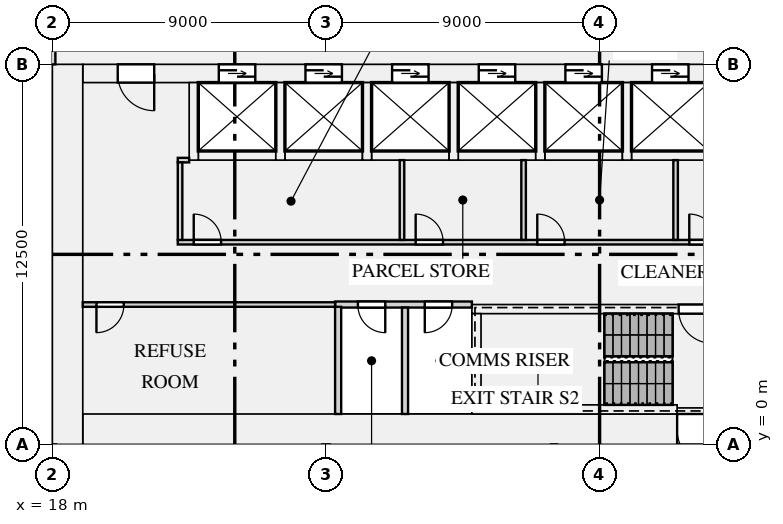
"""IFC4 building model, lengths in metres.
Left out: names, types, materials, properties, quantities, classifications, styles, units other than length and angle.
Written with IfcOpenShell. Run it as: python <this file> out.ifc"""

import sys

from ifc_helpers import new_model, si_unit, direction, frame, frame_2d, origin, place, context, subcontext, project, spatial, rectangle, extrude, element, fill, save


model = new_model("IFC4")
c1 = context("Model", 3, precision=1e-05, world=origin(), true_north=direction((0.0, 1.0)))
c2 = subcontext(c1, "Body", "Model", "MODEL_VIEW")
j1 = project(units=[si_unit("LENGTHUNIT", "METRE"), si_unit("PLANEANGLEUNIT", "RADIAN")], contexts=[c1])
p1 = place(None, origin())
s1 = spatial("IfcSite", under=j1, at=p1, CompositionType="ELEMENT")
p2 = place(p1, origin())
s2 = spatial("IfcBuilding", under=s1, at=p2, CompositionType="ELEMENT")
p3 = place(p2, origin())
s3 = spatial("IfcBuildingStorey", under=s2, at=p3, CompositionType="ELEMENT", Elevation=0.0)
p4 = place(p3, frame((18.5, 0.0, 0.0), z_axis=(0.0, 0.0, 1.0), x_axis=(0.0, 1.0, 0.0)))
e1 = element("IfcWall", 1, at=p4, inside=s3, PredefinedType="SHEAR", context=c2, shape_type="SweptSolid", body=[
    extrude(rectangle(XDim=12.5, YDim=1.0, at=frame_2d((6.25, 0.0))), origin(), (0.0, 0.0, 1.0), 6.5),
])
p5 = place(p3, frame((19.0, 0.5, 0.0), z_axis=(0.0, 0.0, 1.0), x_axis=(1.0, 0.0, 0.0)))
e2 = element("IfcWall", 2, at=p5, inside=s3, PredefinedType="SHEAR", context=c2, shape_type="SweptSolid", body=[
    extrude(rectangle(XDim=34.0, YDim=1.0, at=frame_2d((17.0, 0.0))), origin(), (0.0, 0.0, 1.0), 6.5),
])
p6 = place(p5, frame((19.55, 0.0, 0.0)))
e3 = element("IfcOpeningElement", 3, at=p6, cuts=e2, PredefinedType="OPENING", context=c2, shape_type="SweptSolid", body=[
    extrude(rectangle(XDim=1.2, YDim=2.1, at=frame_2d((0.6, 1.05))), frame((0.0, 0.51, 0.0), z_axis=(0.0, -1.0, 0.0), x_axis=(1.0, 0.0, 0.0)), (0.0, 0.0, 1.0), 1.02),
])
p7 = place(p3, frame((19.0, 12.2, 0.0), z_axis=(0.0, 0.0, 1.0), x_axis=(1.0, 0.0, 0.0)))
e4 = element("IfcWall", 4, at=p7, inside=s3, PredefinedType="SHEAR", context=c2, shape_type="SweptSolid", body=[
    extrude(rectangle(XDim=34.0, YDim=0.6, at=frame_2d((17.0, 0.0))), origin(), (0.0, 0.0, 1.0), 6.5),
])
p8 = place(p7, frame((4.475, 0.0, 0.0)))
e5 = element("IfcOpeningElement", 5, at=p8, cuts=e4, PredefinedType="OPENING", context=c2, shape_type="SweptSolid", body=[
    extrude(rectangle(XDim=1.2, YDim=2.1, at=frame_2d((0.6, 1.05))), frame((0.0, 0.31, 0.0), z_axis=(0.0, -1.0, 0.0), x_axis=(1.0, 0.0, 0.0)), (0.0, 0.0, 1.0), 0.62),
])
p9 = place(p7, frame((7.325, 0.0, 0.0)))
e6 = element("IfcOpeningElement", 6, at=p9, cuts=e4, PredefinedType="OPENING", context=c2, shape_type="SweptSolid", body=[
    extrude(rectangle(XDim=1.2, YDim=2.1, at=frame_2d((0.6, 1.05))), frame((0.0, 0.31, 0.0), z_axis=(0.0, -1.0, 0.0), x_axis=(1.0, 0.0, 0.0)), (0.0, 0.0, 1.0), 0.62),
])
p10 = place(p7, frame((10.175, 0.0, 0.0)))
e7 = element("IfcOpeningElement", 7, at=p10, cuts=e4, PredefinedType="OPENING", context=c2, shape_type="SweptSolid", body=[
    extrude(rectangle(XDim=1.2, YDim=2.1, at=frame_2d((0.6, 1.05))), frame((0.0, 0.31, 0.0), z_axis=(0.0, -1.0, 0.0), x_axis=(1.0, 0.0, 0.0)), (0.0, 0.0, 1.0), 0.62),
])
p11 = place(p7, frame((13.025, 0.0, 0.0)))
e8 = element("IfcOpeningElement", 8, at=p11, cuts=e4, PredefinedType="OPENING", context=c2, shape_type="SweptSolid", body=[
    extrude(rectangle(XDim=1.2, YDim=2.1, at=frame_2d((0.6, 1.05))), frame((0.0, 0.31, 0.0), z_axis=(0.0, -1.0, 0.0), x_axis=(1.0, 0.0, 0.0)), (0.0, 0.0, 1.0), 0.62),
])
p12 = place(p7, frame((15.875, 0.0, 0.0)))
e9 = element("IfcOpeningElement", 9, at=p12, cuts=e4, PredefinedType="OPENING", context=c2, shape_type="SweptSolid", body=[
    extrude(rectangle(XDim=1.2, YDim=2.1, at=frame_2d((0.6, 1.05))), frame((0.0, 0.31, 0.0), z_axis=(0.0, -1.0, 0.0), x_axis=(1.0, 0.0, 0.0)), (0.0, 0.0, 1.0), 0.62),
])
p13 = place(p7, frame((18.725, 0.0, 0.0)))
e10 = element("IfcOpeningElement", 10, at=p13, cuts=e4, PredefinedType="OPENING", context=c2, shape_type="SweptSolid", body=[
    extrude(rectangle(XDim=1.2, YDim=2.1, at=frame_2d((0.6, 1.05))), frame((0.0, 0.31, 0.0), z_axis=(0.0, -1.0, 0.0), x_axis=(1.0, 0.0, 0.0)), (0.0, 0.0, 1.0), 0.62),
])
p14 = place(p7, frame((21.575, 0.0, 0.0)))
e11 = element("IfcOpeningElement", 11, at=p14, cuts=e4, PredefinedType="OPENING", context=c2, shape_type="SweptSolid", body=[
    extrude(rectangle(XDim=1.2, YDim=2.1, at=frame_2d((0.6, 1.05))), frame((0.0, 0.31, 0.0), z_axis=(0.0, -1.0, 0.0), x_axis=(1.0, 0.0, 0.0)), (0.0, 0.0, 1.0), 0.62),
])
p15 = place(p7, frame((24.175, 0.0, 0.0)))
e12 = element("IfcOpeningElement", 12, at=p15, cuts=e4, PredefinedType="OPENING", context=c2, shape_type="SweptSolid", body=[
    extrude(rectangle(XDim=1.1, YDim=2.1, at=frame_2d((0.55, 1.05))), frame((0.0, 0.31, 0.0), z_axis=(0.0, -1.0, 0.0), x_axis=(1.0, 0.0, 0.0)), (0.0, 0.0, 1.0), 0.62),
])
p16 = place(p7, frame((26.425, 0.0, 0.0)))
e13 = element("IfcOpeningElement", 13, at=p16, cuts=e4, PredefinedType="OPENING", context=c2, shape_type="SweptSolid", body=[
    extrude(rectangle(XDim=1.1, YDim=2.1, at=frame_2d((0.55, 1.05))), frame((0.0, 0.31, 0.0), z_axis=(0.0, -1.0, 0.0), x_axis=(1.0, 0.0, 0.0)), (0.0, 0.0, 1.0), 0.62),
])
p17 = place(p7, frame((28.675, 0.0, 0.0)))
e14 = element("IfcOpeningElement", 14, at=p17, cuts=e4, PredefinedType="OPENING", context=c2, shape_type="SweptSolid", body=[
    extrude(rectangle(XDim=1.1, YDim=2.1, at=frame_2d((0.55, 1.05))), frame((0.0, 0.31, 0.0), z_axis=(0.0, -1.0, 0.0), x_axis=(1.0, 0.0, 0.0)), (0.0, 0.0, 1.0), 0.62),
])
p18 = place(p7, frame((1.15, 0.0, 0.0)))
e15 = element("IfcOpeningElement", 15, at=p18, cuts=e4, PredefinedType="OPENING", context=c2, shape_type="SweptSolid", body=[
    extrude(rectangle(XDim=1.2, YDim=2.1, at=frame_2d((0.6, 1.05))), frame((0.0, 0.31, 0.0), z_axis=(0.0, -1.0, 0.0), x_axis=(1.0, 0.0, 0.0)), (0.0, 0.0, 1.0), 0.62),
])
p19 = place(p7, frame((31.65, 0.0, 0.0)))
e16 = element("IfcOpeningElement", 16, at=p19, cuts=e4, PredefinedType="OPENING", context=c2, shape_type="SweptSolid", body=[
    extrude(rectangle(XDim=1.2, YDim=2.1, at=frame_2d((0.6, 1.05))), frame((0.0, 0.31, 0.0), z_axis=(0.0, -1.0, 0.0), x_axis=(1.0, 0.0, 0.0)), (0.0, 0.0, 1.0), 0.62),
])
p20 = place(p3, frame((22.8, 9.5, 0.0), z_axis=(0.0, 0.0, 1.0), x_axis=(1.0, 0.0, 0.0)))
e17 = element("IfcWall", 17, at=p20, inside=s3, PredefinedType="SHEAR", context=c2, shape_type="SweptSolid", body=[
    extrude(rectangle(XDim=2.55, YDim=0.3, at=frame_2d((1.275, 0.0))), origin(), (0.0, 0.0, 1.0), 6.5),
])
p21 = place(p3, frame((22.65, 9.35, 0.0), z_axis=(0.0, 0.0, 1.0), x_axis=(0.0, 1.0, 0.0)))
e18 = element("IfcWall", 18, at=p21, inside=s3, PredefinedType="SHEAR", context=c2, shape_type="SweptSolid", body=[
    extrude(rectangle(XDim=2.55, YDim=0.3, at=frame_2d((1.275, 0.0))), origin(), (0.0, 0.0, 1.0), 6.5),
])
p22 = place(p3, frame((25.65, 9.5, 0.0), z_axis=(0.0, 0.0, 1.0), x_axis=(1.0, 0.0, 0.0)))
e19 = element("IfcWall", 19, at=p22, inside=s3, PredefinedType="SHEAR", context=c2, shape_type="SweptSolid", body=[
    extrude(rectangle(XDim=2.55, YDim=0.3, at=frame_2d((1.275, 0.0))), origin(), (0.0, 0.0, 1.0), 6.5),
])
p23 = place(p3, frame((25.5, 9.35, 0.0), z_axis=(0.0, 0.0, 1.0), x_axis=(0.0, 1.0, 0.0)))
e20 = element("IfcWall", 20, at=p23, inside=s3, PredefinedType="SHEAR", context=c2, shape_type="SweptSolid", body=[
    extrude(rectangle(XDim=2.55, YDim=0.3, at=frame_2d((1.275, 0.0))), origin(), (0.0, 0.0, 1.0), 6.5),
])
p24 = place(p3, frame((28.5, 9.5, 0.0), z_axis=(0.0, 0.0, 1.0), x_axis=(1.0, 0.0, 0.0)))
e21 = element("IfcWall", 21, at=p24, inside=s3, PredefinedType="SHEAR", context=c2, shape_type="SweptSolid", body=[
    extrude(rectangle(XDim=2.55, YDim=0.3, at=frame_2d((1.275, 0.0))), origin(), (0.0, 0.0, 1.0), 6.5),
])
for number, where, z_axis, x_axis in (
    (22, (28.35, 9.35, 0.0), (0.0, 0.0, 1.0), (0.0, 1.0, 0.0)),
    (23, (31.35, 9.5, 0.0), (0.0, 0.0, 1.0), (1.0, 0.0, 0.0)),
    (24, (31.2, 9.35, 0.0), (0.0, 0.0, 1.0), (0.0, 1.0, 0.0)),
):
    element("IfcWall", number, at=place(p3, frame(where, z_axis=z_axis, x_axis=x_axis)), inside=s3, PredefinedType="SHEAR", context=c2, shape_type="SweptSolid", body=[
        extrude(rectangle(XDim=2.55, YDim=0.3, at=frame_2d((1.275, 0.0))), origin(), (0.0, 0.0, 1.0), 6.5),
    ])
p25 = place(p3, frame((34.2, 9.5, 0.0), z_axis=(0.0, 0.0, 1.0), x_axis=(1.0, 0.0, 0.0)))
e25 = element("IfcWall", 25, at=p25, inside=s3, PredefinedType="SHEAR", context=c2, shape_type="SweptSolid", body=[
    extrude(rectangle(XDim=2.55, YDim=0.3, at=frame_2d((1.275, 0.0))), origin(), (0.0, 0.0, 1.0), 6.5),
])
p26 = place(p3, frame((34.05, 9.35, 0.0), z_axis=(0.0, 0.0, 1.0), x_axis=(0.0, 1.0, 0.0)))
e26 = element("IfcWall", 26, at=p26, inside=s3, PredefinedType="SHEAR", context=c2, shape_type="SweptSolid", body=[
    extrude(rectangle(XDim=2.55, YDim=0.3, at=frame_2d((1.275, 0.0))), origin(), (0.0, 0.0, 1.0), 6.5),
])
p27 = place(p3, frame((37.05, 9.5, 0.0), z_axis=(0.0, 0.0, 1.0), x_axis=(1.0, 0.0, 0.0)))
e27 = element("IfcWall", 27, at=p27, inside=s3, PredefinedType="SHEAR", context=c2, shape_type="SweptSolid", body=[
    extrude(rectangle(XDim=2.55, YDim=0.3, at=frame_2d((1.275, 0.0))), origin(), (0.0, 0.0, 1.0), 6.5),
])
p28 = place(p3, frame((36.9, 9.35, 0.0), z_axis=(0.0, 0.0, 1.0), x_axis=(0.0, 1.0, 0.0)))
e28 = element("IfcWall", 28, at=p28, inside=s3, PredefinedType="SHEAR", context=c2, shape_type="SweptSolid", body=[
    extrude(rectangle(XDim=2.55, YDim=0.3, at=frame_2d((1.275, 0.0))), origin(), (0.0, 0.0, 1.0), 6.5),
])
p29 = place(p3, frame((31.8, 1.15, 0.0), z_axis=(0.0, 0.0, 1.0), x_axis=(1.0, 0.0, 0.0)))
e29 = element("IfcWall", 29, at=p29, inside=s3, PredefinedType="SHEAR", context=c2, shape_type="SweptSolid", body=[
    extrude(rectangle(XDim=6.75, YDim=0.3, at=frame_2d((3.375, 0.0))), origin(), (0.0, 0.0, 1.0), 6.5),
])
p30 = place(p3, frame((31.8, 4.45, 0.0), z_axis=(0.0, 0.0, 1.0), x_axis=(1.0, 0.0, 0.0)))
e30 = element("IfcWall", 30, at=p30, inside=s3, PredefinedType="SHEAR", context=c2, shape_type="SweptSolid", body=[
    extrude(rectangle(XDim=8.4, YDim=0.3, at=frame_2d((4.2, 0.0))), origin(), (0.0, 0.0, 1.0), 6.5),
])
p31 = place(p30, frame((6.8, 0.0, 0.0)))
e31 = element("IfcOpeningElement", 31, at=p31, cuts=e30, PredefinedType="OPENING", context=c2, shape_type="SweptSolid", body=[
    extrude(rectangle(XDim=1.1, YDim=2.1, at=frame_2d((0.55, 1.05))), frame((0.0, 0.16, 0.0), z_axis=(0.0, -1.0, 0.0), x_axis=(1.0, 0.0, 0.0)), (0.0, 0.0, 1.0), 0.32),
])
p32 = place(p3, frame((31.95, 1.3, 0.0), z_axis=(0.0, 0.0, 1.0), x_axis=(0.0, 1.0, 0.0)))
e32 = element("IfcWall", 32, at=p32, inside=s3, PredefinedType="SHEAR", context=c2, shape_type="SweptSolid", body=[
    extrude(rectangle(XDim=3.0, YDim=0.3, at=frame_2d((1.5, 0.0))), origin(), (0.0, 0.0, 1.0), 6.5),
])
p33 = place(p3, frame((27.3, 4.6, 0.0), z_axis=(0.0, 0.0, 1.0), x_axis=(1.0, 0.0, 0.0)))
e33 = element("IfcWall", 33, at=p33, inside=s3, PredefinedType="PARTITIONING", context=c2, shape_type="SweptSolid", body=[
    extrude(rectangle(XDim=4.5, YDim=0.2, at=frame_2d((2.25, 0.0))), origin(), (0.0, 0.0, 1.0), 6.098),
])
p34 = place(p33, frame((0.75, 0.0, 0.0)))
e34 = element("IfcOpeningElement", 34, at=p34, cuts=e33, PredefinedType="OPENING", context=c2, shape_type="SweptSolid", body=[
    extrude(rectangle(XDim=0.9, YDim=2.1, at=frame_2d((0.45, 1.05))), frame((0.0, 0.11, 0.0), z_axis=(0.0, -1.0, 0.0), x_axis=(1.0, 0.0, 0.0)), (0.0, 0.0, 1.0), 0.22),
])
p35 = place(p33, frame((2.95, 0.0, 0.0)))
e35 = element("IfcOpeningElement", 35, at=p35, cuts=e33, PredefinedType="OPENING", context=c2, shape_type="SweptSolid", body=[
    extrude(rectangle(XDim=0.9, YDim=2.1, at=frame_2d((0.45, 1.05))), frame((0.0, 0.11, 0.0), z_axis=(0.0, -1.0, 0.0), x_axis=(1.0, 0.0, 0.0)), (0.0, 0.0, 1.0), 0.22),
])
p36 = place(p3, frame((19.0, 4.6, 0.0), z_axis=(0.0, 0.0, 1.0), x_axis=(1.0, 0.0, 0.0)))
e36 = element("IfcWall", 36, at=p36, inside=s3, PredefinedType="PARTITIONING", context=c2, shape_type="SweptSolid", body=[
    extrude(rectangle(XDim=8.3, YDim=0.15, at=frame_2d((4.15, 0.0))), origin(), (0.0, 0.0, 1.0), 6.098),
])
p37 = place(p36, frame((0.45, 0.0, 0.0)))
e37 = element("IfcOpeningElement", 37, at=p37, cuts=e36, PredefinedType="OPENING", context=c2, shape_type="SweptSolid", body=[
    extrude(rectangle(XDim=0.9, YDim=2.1, at=frame_2d((0.45, 1.05))), frame((0.0, 0.085, 0.0), z_axis=(0.0, -1.0, 0.0), x_axis=(1.0, 0.0, 0.0)), (0.0, 0.0, 1.0), 0.17),
])
p38 = place(p3, frame((22.125, 6.65, 0.0), z_axis=(0.0, 0.0, 1.0), x_axis=(1.0, 0.0, 0.0)))
e38 = element("IfcWall", 38, at=p38, inside=s3, PredefinedType="PARTITIONING", context=c2, shape_type="SweptSolid", body=[
    extrude(rectangle(XDim=20.4, YDim=0.15, at=frame_2d((10.2, 0.0))), origin(), (0.0, 0.0, 1.0), 6.098),
])
p39 = place(p38, frame((0.525, 0.0, 0.0)))
e39 = element("IfcOpeningElement", 39, at=p39, cuts=e38, PredefinedType="OPENING", context=c2, shape_type="SweptSolid", body=[
    extrude(rectangle(XDim=0.9, YDim=2.1, at=frame_2d((0.45, 1.05))), frame((0.0, 0.085, 0.0), z_axis=(0.0, -1.0, 0.0), x_axis=(1.0, 0.0, 0.0)), (0.0, 0.0, 1.0), 0.17),
])
p40 = place(p38, frame((7.825, 0.0, 0.0)))
e40 = element("IfcOpeningElement", 40, at=p40, cuts=e38, PredefinedType="OPENING", context=c2, shape_type="SweptSolid", body=[
    extrude(rectangle(XDim=0.9, YDim=2.1, at=frame_2d((0.45, 1.05))), frame((0.0, 0.085, 0.0), z_axis=(0.0, -1.0, 0.0), x_axis=(1.0, 0.0, 0.0)), (0.0, 0.0, 1.0), 0.17),
])
p41 = place(p38, frame((11.825, 0.0, 0.0)))
e41 = element("IfcOpeningElement", 41, at=p41, cuts=e38, PredefinedType="OPENING", context=c2, shape_type="SweptSolid", body=[
    extrude(rectangle(XDim=0.9, YDim=2.1, at=frame_2d((0.45, 1.05))), frame((0.0, 0.085, 0.0), z_axis=(0.0, -1.0, 0.0), x_axis=(1.0, 0.0, 0.0)), (0.0, 0.0, 1.0), 0.17),
])
p42 = place(p38, frame((16.825, 0.0, 0.0)))
e42 = element("IfcOpeningElement", 42, at=p42, cuts=e38, PredefinedType="OPENING", context=c2, shape_type="SweptSolid", body=[
    extrude(rectangle(XDim=0.9, YDim=2.1, at=frame_2d((0.45, 1.05))), frame((0.0, 0.085, 0.0), z_axis=(0.0, -1.0, 0.0), x_axis=(1.0, 0.0, 0.0)), (0.0, 0.0, 1.0), 0.17),
])
p43 = place(p3, frame((22.125, 9.35, 0.0), z_axis=(0.0, 0.0, 1.0), x_axis=(1.0, 0.0, 0.0)))
e43 = element("IfcWall", 43, at=p43, inside=s3, PredefinedType="PARTITIONING", context=c2, shape_type="SweptSolid", body=[
    extrude(rectangle(XDim=0.375, YDim=0.15, at=frame_2d((0.188, 0.0))), origin(), (0.0, 0.0, 1.0), 6.098),
])
p44 = place(p3, frame((27.4, 1.0, 0.0), z_axis=(0.0, 0.0, 1.0), x_axis=(0.0, 1.0, 0.0)))
e44 = element("IfcWall", 44, at=p44, inside=s3, PredefinedType="PARTITIONING", context=c2, shape_type="SweptSolid", body=[
    extrude(rectangle(XDim=3.525, YDim=0.2, at=frame_2d((1.762, 0.0))), origin(), (0.0, 0.0, 1.0), 6.098),
])
p45 = place(p3, frame((29.6, 1.0, 0.0), z_axis=(0.0, 0.0, 1.0), x_axis=(0.0, 1.0, 0.0)))
e45 = element("IfcWall", 45, at=p45, inside=s3, PredefinedType="PARTITIONING", context=c2, shape_type="SweptSolid", body=[
    extrude(rectangle(XDim=3.5, YDim=0.2, at=frame_2d((1.75, 0.0))), origin(), (0.0, 0.0, 1.0), 6.098),
])
p46 = place(p3, frame((22.2, 6.725, 0.0), z_axis=(0.0, 0.0, 1.0), x_axis=(0.0, 1.0, 0.0)))
e46 = element("IfcWall", 46, at=p46, inside=s3, PredefinedType="PARTITIONING", context=c2, shape_type="SweptSolid", body=[
    extrude(rectangle(XDim=2.55, YDim=0.15, at=frame_2d((1.275, 0.0))), origin(), (0.0, 0.0, 1.0), 6.098),
])
for number, where, z_axis, x_axis in (
    (47, (29.5, 6.725, 0.0), (0.0, 0.0, 1.0), (0.0, 1.0, 0.0)),
    (48, (33.5, 6.725, 0.0), (0.0, 0.0, 1.0), (0.0, 1.0, 0.0)),
    (49, (38.5, 6.725, 0.0), (0.0, 0.0, 1.0), (0.0, 1.0, 0.0)),
):
    element("IfcWall", number, at=place(p3, frame(where, z_axis=z_axis, x_axis=x_axis)), inside=s3, PredefinedType="PARTITIONING", context=c2, shape_type="SweptSolid", body=[
        extrude(rectangle(XDim=2.625, YDim=0.15, at=frame_2d((1.312, 0.0))), origin(), (0.0, 0.0, 1.0), 6.098),
    ])
p47 = place(p3, frame((18.0, 12.5, 0.0), z_axis=(0.0, 0.0, 1.0), x_axis=(0.0, 1.0, 0.0)))
e50 = element("IfcWall", 50, at=p47, inside=s3, PredefinedType="PARTITIONING", context=c2, shape_type="SweptSolid", body=[
    extrude(rectangle(XDim=3.4, YDim=0.2, at=frame_2d((1.7, 0.0))), origin(), (0.0, 0.0, 1.0), 6.098),
])
p48 = place(p8, origin())
e51 = element("IfcDoor", 51, at=p48, inside=s3, OperationType="DOUBLE_DOOR_SLIDING", PredefinedType="DOOR", context=c2, shape_type="SweptSolid", body=[
    extrude(rectangle(XDim=1.2, YDim=2.1, at=frame_2d((0.6, 1.05))), frame((0.0, 0.025, 0.0), z_axis=(0.0, -1.0, 0.0), x_axis=(1.0, 0.0, 0.0)), (0.0, 0.0, 1.0), 0.05),
])
fill(e5, e51)
p49 = place(p9, origin())
e52 = element("IfcDoor", 52, at=p49, inside=s3, OperationType="DOUBLE_DOOR_SLIDING", PredefinedType="DOOR", context=c2, shape_type="SweptSolid", body=[
    extrude(rectangle(XDim=1.2, YDim=2.1, at=frame_2d((0.6, 1.05))), frame((0.0, 0.025, 0.0), z_axis=(0.0, -1.0, 0.0), x_axis=(1.0, 0.0, 0.0)), (0.0, 0.0, 1.0), 0.05),
])
fill(e6, e52)
p50 = place(p10, origin())
e53 = element("IfcDoor", 53, at=p50, inside=s3, OperationType="DOUBLE_DOOR_SLIDING", PredefinedType="DOOR", context=c2, shape_type="SweptSolid", body=[
    extrude(rectangle(XDim=1.2, YDim=2.1, at=frame_2d((0.6, 1.05))), frame((0.0, 0.025, 0.0), z_axis=(0.0, -1.0, 0.0), x_axis=(1.0, 0.0, 0.0)), (0.0, 0.0, 1.0), 0.05),
])
fill(e7, e53)
p51 = place(p11, origin())
e54 = element("IfcDoor", 54, at=p51, inside=s3, OperationType="DOUBLE_DOOR_SLIDING", PredefinedType="DOOR", context=c2, shape_type="SweptSolid", body=[
    extrude(rectangle(XDim=1.2, YDim=2.1, at=frame_2d((0.6, 1.05))), frame((0.0, 0.025, 0.0), z_axis=(0.0, -1.0, 0.0), x_axis=(1.0, 0.0, 0.0)), (0.0, 0.0, 1.0), 0.05),
])
fill(e8, e54)
p52 = place(p12, origin())
e55 = element("IfcDoor", 55, at=p52, inside=s3, OperationType="DOUBLE_DOOR_SLIDING", PredefinedType="DOOR", context=c2, shape_type="SweptSolid", body=[
    extrude(rectangle(XDim=1.2, YDim=2.1, at=frame_2d((0.6, 1.05))), frame((0.0, 0.025, 0.0), z_axis=(0.0, -1.0, 0.0), x_axis=(1.0, 0.0, 0.0)), (0.0, 0.0, 1.0), 0.05),
])
fill(e9, e55)
p53 = place(p13, origin())
e56 = element("IfcDoor", 56, at=p53, inside=s3, OperationType="DOUBLE_DOOR_SLIDING", PredefinedType="DOOR", context=c2, shape_type="SweptSolid", body=[
    extrude(rectangle(XDim=1.2, YDim=2.1, at=frame_2d((0.6, 1.05))), frame((0.0, 0.025, 0.0), z_axis=(0.0, -1.0, 0.0), x_axis=(1.0, 0.0, 0.0)), (0.0, 0.0, 1.0), 0.05),
])
fill(e10, e56)
p54 = place(p31, frame((1.1, 0.0, 0.0), z_axis=(0.0, 0.0, 1.0), x_axis=(-1.0, 0.0, 0.0)))
e57 = element("IfcDoor", 57, at=p54, inside=s3, OperationType="SINGLE_SWING_LEFT", PredefinedType="DOOR", context=c2, shape_type="SweptSolid", body=[
    extrude(rectangle(XDim=1.1, YDim=2.1, at=frame_2d((0.55, 1.05))), frame((0.0, 0.025, 0.0), z_axis=(0.0, -1.0, 0.0), x_axis=(1.0, 0.0, 0.0)), (0.0, 0.0, 1.0), 0.05),
])
fill(e31, e57)
p55 = place(p39, origin())
e58 = element("IfcDoor", 58, at=p55, inside=s3, OperationType="SINGLE_SWING_LEFT", PredefinedType="DOOR", context=c2, shape_type="SweptSolid", body=[
    extrude(rectangle(XDim=0.9, YDim=2.1, at=frame_2d((0.45, 1.05))), frame((0.0, 0.025, 0.0), z_axis=(0.0, -1.0, 0.0), x_axis=(1.0, 0.0, 0.0)), (0.0, 0.0, 1.0), 0.05),
])
fill(e39, e58)
p56 = place(p40, origin())
e59 = element("IfcDoor", 59, at=p56, inside=s3, OperationType="SINGLE_SWING_LEFT", PredefinedType="DOOR", context=c2, shape_type="SweptSolid", body=[
    extrude(rectangle(XDim=0.9, YDim=2.1, at=frame_2d((0.45, 1.05))), frame((0.0, 0.025, 0.0), z_axis=(0.0, -1.0, 0.0), x_axis=(1.0, 0.0, 0.0)), (0.0, 0.0, 1.0), 0.05),
])
fill(e40, e59)
p57 = place(p41, origin())
e60 = element("IfcDoor", 60, at=p57, inside=s3, OperationType="SINGLE_SWING_LEFT", PredefinedType="DOOR", context=c2, shape_type="SweptSolid", body=[
    extrude(rectangle(XDim=0.9, YDim=2.1, at=frame_2d((0.45, 1.05))), frame((0.0, 0.025, 0.0), z_axis=(0.0, -1.0, 0.0), x_axis=(1.0, 0.0, 0.0)), (0.0, 0.0, 1.0), 0.05),
])
fill(e41, e60)
p58 = place(p42, origin())
e61 = element("IfcDoor", 61, at=p58, inside=s3, OperationType="SINGLE_SWING_LEFT", PredefinedType="DOOR", context=c2, shape_type="SweptSolid", body=[
    extrude(rectangle(XDim=0.9, YDim=2.1, at=frame_2d((0.45, 1.05))), frame((0.0, 0.025, 0.0), z_axis=(0.0, -1.0, 0.0), x_axis=(1.0, 0.0, 0.0)), (0.0, 0.0, 1.0), 0.05),
])
fill(e42, e61)
p59 = place(p37, frame((0.9, 0.0, 0.0), z_axis=(0.0, 0.0, 1.0), x_axis=(-1.0, 0.0, 0.0)))
e62 = element("IfcDoor", 62, at=p59, inside=s3, OperationType="SINGLE_SWING_RIGHT", PredefinedType="DOOR", context=c2, shape_type="SweptSolid", body=[
    extrude(rectangle(XDim=0.9, YDim=2.1, at=frame_2d((0.45, 1.05))), frame((0.0, 0.025, 0.0), z_axis=(0.0, -1.0, 0.0), x_axis=(1.0, 0.0, 0.0)), (0.0, 0.0, 1.0), 0.05),
])
fill(e37, e62)
p60 = place(p34, frame((0.9, 0.0, 0.0), z_axis=(0.0, 0.0, 1.0), x_axis=(-1.0, 0.0, 0.0)))
e63 = element("IfcDoor", 63, at=p60, inside=s3, OperationType="SINGLE_SWING_LEFT", PredefinedType="DOOR", context=c2, shape_type="SweptSolid", body=[
    extrude(rectangle(XDim=0.9, YDim=2.1, at=frame_2d((0.45, 1.05))), frame((0.0, 0.025, 0.0), z_axis=(0.0, -1.0, 0.0), x_axis=(1.0, 0.0, 0.0)), (0.0, 0.0, 1.0), 0.05),
])
fill(e34, e63)
p61 = place(p35, frame((0.9, 0.0, 0.0), z_axis=(0.0, 0.0, 1.0), x_axis=(-1.0, 0.0, 0.0)))
e64 = element("IfcDoor", 64, at=p61, inside=s3, OperationType="SINGLE_SWING_RIGHT", PredefinedType="DOOR", context=c2, shape_type="SweptSolid", body=[
    extrude(rectangle(XDim=0.9, YDim=2.1, at=frame_2d((0.45, 1.05))), frame((0.0, 0.025, 0.0), z_axis=(0.0, -1.0, 0.0), x_axis=(1.0, 0.0, 0.0)), (0.0, 0.0, 1.0), 0.05),
])
fill(e35, e64)
p62 = place(p18, frame((1.2, 0.0, 0.0), z_axis=(0.0, 0.0, 1.0), x_axis=(-1.0, 0.0, 0.0)))
e65 = element("IfcDoor", 65, at=p62, inside=s3, OperationType="SINGLE_SWING_LEFT", PredefinedType="DOOR", context=c2, shape_type="SweptSolid", body=[
    extrude(rectangle(XDim=1.2, YDim=2.1, at=frame_2d((0.6, 1.05))), frame((0.0, 0.025, 0.0), z_axis=(0.0, -1.0, 0.0), x_axis=(1.0, 0.0, 0.0)), (0.0, 0.0, 1.0), 0.05),
])
fill(e15, e65)
p63 = place(p6, frame((1.2, 0.0, 0.0), z_axis=(0.0, 0.0, 1.0), x_axis=(-1.0, 0.0, 0.0)))
e66 = element("IfcDoor", 66, at=p63, inside=s3, OperationType="SINGLE_SWING_LEFT", PredefinedType="DOOR", context=c2, shape_type="SweptSolid", body=[
    extrude(rectangle(XDim=1.2, YDim=2.1, at=frame_2d((0.6, 1.05))), frame((0.0, 0.025, 0.0), z_axis=(0.0, -1.0, 0.0), x_axis=(1.0, 0.0, 0.0)), (0.0, 0.0, 1.0), 0.05),
])
fill(e3, e66)
save(model, sys.argv[1])
